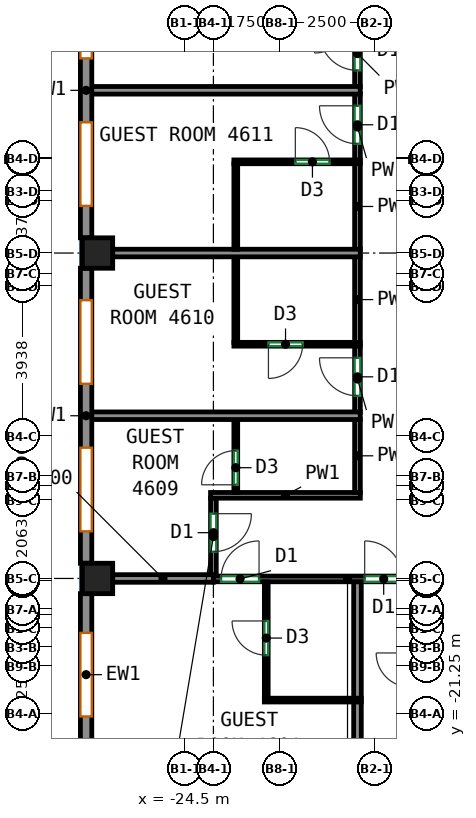
"""IFC4 building model, lengths in metres.
Left out: names, types, materials, properties, quantities, classifications, styles, units other than length and angle.
Written with IfcOpenShell. Run it as: python <this file> out.ifc"""

import sys

from ifc_helpers import new_model, si_unit, direction, frame, frame_2d, origin, origin_2d, place, context, subcontext, project, spatial, rectangle, extrude, source, transform, mapped, element, fill, save


model = new_model("IFC4")
c1 = context("Model", 3, precision=1e-05, world=origin(), true_north=direction((0.0, 1.0)))
c2 = subcontext(c1, "Body", "Model", "MODEL_VIEW")
j1 = project(units=[si_unit("LENGTHUNIT", "METRE"), si_unit("PLANEANGLEUNIT", "RADIAN")], contexts=[c1])
p1 = place(None, origin())
s1 = spatial("IfcSite", under=j1, at=p1, CompositionType="ELEMENT")
p2 = place(p1, origin())
s2 = spatial("IfcBuilding", under=s1, at=p2, CompositionType="ELEMENT")
p3 = place(p2, frame((0.0, 0.0, 192.3)))
s3 = spatial("IfcBuildingStorey", under=s2, at=p3, CompositionType="ELEMENT", Elevation=192.3)
m1 = source(origin(), c2, "Body", "SweptSolid", [
    extrude(rectangle(XDim=0.8, YDim=0.8, at=origin_2d()), origin(), (0.0, 0.0, 1.0), 3.0),
])
for number, where, z_axis, x_axis in (
    (1, (-26.8, -17.688, 0.0), (0.0, 0.0, 1.0), (1.0, 0.0, 0.0)),
    (2, (-26.8, -9.125, 0.0), (0.0, 0.0, 1.0), (1.0, 0.0, 0.0)),
):
    element("IfcColumn", number, at=place(p3, frame(where, z_axis=z_axis, x_axis=x_axis)), inside=s3, PredefinedType="COLUMN", context=c2, shape_type="MappedRepresentation", body=[
        mapped(m1, transform((0.0, 0.0, 0.0))),
    ])
m2 = source(origin(), c2, "Body", "SweptSolid", [
    extrude(rectangle(XDim=7.763, YDim=0.3, at=frame_2d((3.881, 0.0))), origin(), (0.0, 0.0, 1.0), 3.0),
])
p4 = place(p3, frame((-27.1, -0.962, 0.0), z_axis=(0.0, 0.0, 1.0), x_axis=(0.0, -1.0, 0.0)))
e3 = element("IfcWall", 3, at=p4, inside=s3, PredefinedType="SOLIDWALL", context=c2, shape_type="MappedRepresentation", body=[
    mapped(m2, transform((0.0, 0.0, 0.0))),
])
p5 = place(p4, frame((0.841, 0.0, 0.85)))
e4 = element("IfcOpeningElement", 4, at=p5, cuts=e3, PredefinedType="OPENING", context=c2, shape_type="SweptSolid", body=[
    extrude(rectangle(XDim=2.2, YDim=1.95, at=frame_2d((1.1, 0.975))), frame((0.0, 0.16, 0.0), z_axis=(0.0, -1.0, 0.0), x_axis=(1.0, 0.0, 0.0)), (0.0, 0.0, 1.0), 0.32),
])
p6 = place(p4, frame((4.722, 0.0, 0.85)))
e5 = element("IfcOpeningElement", 5, at=p6, cuts=e3, PredefinedType="OPENING", context=c2, shape_type="SweptSolid", body=[
    extrude(rectangle(XDim=2.2, YDim=1.95, at=frame_2d((1.1, 0.975))), frame((0.0, 0.16, 0.0), z_axis=(0.0, -1.0, 0.0), x_axis=(1.0, 0.0, 0.0)), (0.0, 0.0, 1.0), 0.32),
])
p7 = place(p3, frame((-27.1, -9.525, 0.0), z_axis=(0.0, 0.0, 1.0), x_axis=(0.0, -1.0, 0.0)))
e6 = element("IfcWall", 6, at=p7, inside=s3, PredefinedType="SOLIDWALL", context=c2, shape_type="MappedRepresentation", body=[
    mapped(m2, transform((0.0, 0.0, 0.0))),
])
p8 = place(p7, frame((0.841, 0.0, 0.85)))
e7 = element("IfcOpeningElement", 7, at=p8, cuts=e6, PredefinedType="OPENING", context=c2, shape_type="SweptSolid", body=[
    extrude(rectangle(XDim=2.2, YDim=1.95, at=frame_2d((1.1, 0.975))), frame((0.0, 0.16, 0.0), z_axis=(0.0, -1.0, 0.0), x_axis=(1.0, 0.0, 0.0)), (0.0, 0.0, 1.0), 0.32),
])
p9 = place(p7, frame((4.722, 0.0, 0.85)))
e8 = element("IfcOpeningElement", 8, at=p9, cuts=e6, PredefinedType="OPENING", context=c2, shape_type="SweptSolid", body=[
    extrude(rectangle(XDim=2.2, YDim=1.95, at=frame_2d((1.1, 0.975))), frame((0.0, 0.16, 0.0), z_axis=(0.0, -1.0, 0.0), x_axis=(1.0, 0.0, 0.0)), (0.0, 0.0, 1.0), 0.32),
])
m3 = source(origin(), c2, "Body", "SweptSolid", [
    extrude(rectangle(XDim=4.263, YDim=0.3, at=frame_2d((2.131, 0.0))), origin(), (0.0, 0.0, 1.0), 3.0),
])
p10 = place(p3, frame((-27.1, -18.087, 0.0), z_axis=(0.0, 0.0, 1.0), x_axis=(0.0, -1.0, 0.0)))
e9 = element("IfcWall", 9, at=p10, inside=s3, PredefinedType="SOLIDWALL", context=c2, shape_type="MappedRepresentation", body=[
    mapped(m3, transform((0.0, 0.0, 0.0))),
])
p11 = place(p10, frame((1.031, 0.0, 0.85)))
e10 = element("IfcOpeningElement", 10, at=p11, cuts=e9, PredefinedType="OPENING", context=c2, shape_type="SweptSolid", body=[
    extrude(rectangle(XDim=2.2, YDim=1.95, at=frame_2d((1.1, 0.975))), frame((0.0, 0.16, 0.0), z_axis=(0.0, -1.0, 0.0), x_axis=(1.0, 0.0, 0.0)), (0.0, 0.0, 1.0), 0.32),
])
p12 = place(p3, frame((-23.75, -17.7, 0.0), z_axis=(0.0, 0.0, 1.0), x_axis=(1.0, 0.0, 0.0)))
e11 = element("IfcWall", 11, at=p12, inside=s3, PredefinedType="PARTITIONING", context=c2, shape_type="SweptSolid", body=[
    extrude(rectangle(XDim=7.058, YDim=0.15, at=frame_2d((3.529, 0.0))), origin(), (0.0, 0.0, 1.0), 2.4),
])
p13 = place(p12, frame((0.201, 0.0, 0.0)))
e12 = element("IfcOpeningElement", 12, at=p13, cuts=e11, PredefinedType="OPENING", context=c2, shape_type="SweptSolid", body=[
    extrude(rectangle(XDim=1.0, YDim=2.1, at=frame_2d((0.5, 1.05))), frame((0.0, 0.085, 0.0), z_axis=(0.0, -1.0, 0.0), x_axis=(1.0, 0.0, 0.0)), (0.0, 0.0, 1.0), 0.17),
])
p14 = place(p12, frame((3.981, 0.0, 0.0)))
e13 = element("IfcOpeningElement", 13, at=p14, cuts=e11, PredefinedType="OPENING", context=c2, shape_type="SweptSolid", body=[
    extrude(rectangle(XDim=1.0, YDim=2.1, at=frame_2d((0.5, 1.05))), frame((0.0, 0.085, 0.0), z_axis=(0.0, -1.0, 0.0), x_axis=(1.0, 0.0, 0.0)), (0.0, 0.0, 1.0), 0.17),
])
p15 = place(p3, frame((-23.75, -15.575, 0.0), z_axis=(0.0, 0.0, 1.0), x_axis=(0.0, -1.0, 0.0)))
e14 = element("IfcWall", 14, at=p15, inside=s3, PredefinedType="PARTITIONING", context=c2, shape_type="SweptSolid", body=[
    extrude(rectangle(XDim=2.023, YDim=0.15, at=frame_2d((1.011, 0.0))), origin(), (0.0, 0.0, 1.0), 2.4),
])
p16 = place(p15, frame((0.408, 0.0, 0.0)))
e15 = element("IfcOpeningElement", 15, at=p16, cuts=e14, PredefinedType="OPENING", context=c2, shape_type="SweptSolid", body=[
    extrude(rectangle(XDim=1.0, YDim=2.1, at=frame_2d((0.5, 1.05))), frame((0.0, 0.085, 0.0), z_axis=(0.0, -1.0, 0.0), x_axis=(1.0, 0.0, 0.0)), (0.0, 0.0, 1.0), 0.17),
])
p17 = place(p3, frame((-23.825, -15.5, 0.0), z_axis=(0.0, 0.0, 1.0), x_axis=(1.0, 0.0, 0.0)))
e16 = element("IfcWall", 16, at=p17, inside=s3, PredefinedType="PARTITIONING", context=c2, shape_type="SweptSolid", body=[
    extrude(rectangle(XDim=3.941, YDim=0.15, at=frame_2d((1.97, 0.0))), origin(), (0.0, 0.0, 1.0), 3.0),
])
p18 = place(p3, frame((-19.959, -15.425, 0.0), z_axis=(0.0, 0.0, 1.0), x_axis=(0.0, 1.0, 0.0)))
e17 = element("IfcWall", 17, at=p18, inside=s3, PredefinedType="PARTITIONING", context=c2, shape_type="SweptSolid", body=[
    extrude(rectangle(XDim=1.929, YDim=0.15, at=frame_2d((0.964, 0.0))), origin(), (0.0, 0.0, 1.0), 3.0),
])
p19 = place(p3, frame((-19.959, -13.316, 0.0), z_axis=(0.0, 0.0, 1.0), x_axis=(0.0, 1.0, 0.0)))
e18 = element("IfcWall", 18, at=p19, inside=s3, PredefinedType="PARTITIONING", context=c2, shape_type="SweptSolid", body=[
    extrude(rectangle(XDim=1.751, YDim=0.15, at=frame_2d((0.875, 0.0))), origin(), (0.0, 0.0, 1.0), 3.0),
])
p20 = place(p19, frame((0.434, 0.0, 0.0)))
e19 = element("IfcOpeningElement", 19, at=p20, cuts=e18, PredefinedType="OPENING", context=c2, shape_type="SweptSolid", body=[
    extrude(rectangle(XDim=1.0, YDim=2.1, at=frame_2d((0.5, 1.05))), frame((0.0, 0.085, 0.0), z_axis=(0.0, -1.0, 0.0), x_axis=(1.0, 0.0, 0.0)), (0.0, 0.0, 1.0), 0.17),
])
p21 = place(p3, frame((-19.959, -11.485, 0.0), z_axis=(0.0, 0.0, 1.0), x_axis=(0.0, 1.0, 0.0)))
e20 = element("IfcWall", 20, at=p21, inside=s3, PredefinedType="PARTITIONING", context=c2, shape_type="SweptSolid", body=[
    extrude(rectangle(XDim=2.27, YDim=0.15, at=frame_2d((1.135, 0.0))), origin(), (0.0, 0.0, 1.0), 3.0),
])
p22 = place(p3, frame((-19.959, -6.685, 0.0), z_axis=(0.0, 0.0, 1.0), x_axis=(0.0, 1.0, 0.0)))
e21 = element("IfcWall", 21, at=p22, inside=s3, PredefinedType="PARTITIONING", context=c2, shape_type="SweptSolid", body=[
    extrude(rectangle(XDim=1.752, YDim=0.15, at=frame_2d((0.876, 0.0))), origin(), (0.0, 0.0, 1.0), 3.0),
])
p23 = place(p22, frame((0.435, 0.0, 0.0)))
e22 = element("IfcOpeningElement", 22, at=p23, cuts=e21, PredefinedType="OPENING", context=c2, shape_type="SweptSolid", body=[
    extrude(rectangle(XDim=1.0, YDim=2.1, at=frame_2d((0.5, 1.05))), frame((0.0, 0.085, 0.0), z_axis=(0.0, -1.0, 0.0), x_axis=(1.0, 0.0, 0.0)), (0.0, 0.0, 1.0), 0.17),
])
p24 = place(p3, frame((-19.959, -9.035, 0.0), z_axis=(0.0, 0.0, 1.0), x_axis=(0.0, 1.0, 0.0)))
e23 = element("IfcWall", 23, at=p24, inside=s3, PredefinedType="PARTITIONING", context=c2, shape_type="SweptSolid", body=[
    extrude(rectangle(XDim=2.27, YDim=0.15, at=frame_2d((1.135, 0.0))), origin(), (0.0, 0.0, 1.0), 3.0),
])
p25 = place(p3, frame((-19.959, -4.753, 0.0), z_axis=(0.0, 0.0, 1.0), x_axis=(0.0, 1.0, 0.0)))
e24 = element("IfcWall", 24, at=p25, inside=s3, PredefinedType="PARTITIONING", context=c2, shape_type="SweptSolid", body=[
    extrude(rectangle(XDim=1.751, YDim=0.15, at=frame_2d((0.875, 0.0))), origin(), (0.0, 0.0, 1.0), 3.0),
])
p26 = place(p25, frame((0.434, 0.0, 0.0)))
e25 = element("IfcOpeningElement", 25, at=p26, cuts=e24, PredefinedType="OPENING", context=c2, shape_type="SweptSolid", body=[
    extrude(rectangle(XDim=1.0, YDim=2.1, at=frame_2d((0.5, 1.05))), frame((0.0, 0.085, 0.0), z_axis=(0.0, -1.0, 0.0), x_axis=(1.0, 0.0, 0.0)), (0.0, 0.0, 1.0), 0.17),
])
p27 = place(p3, frame((-22.359, -20.838, 0.0), z_axis=(0.0, 0.0, 1.0), x_axis=(0.0, 1.0, 0.0)))
e26 = element("IfcWall", 26, at=p27, inside=s3, PredefinedType="PARTITIONING", context=c2, shape_type="SweptSolid", body=[
    extrude(rectangle(XDim=3.061, YDim=0.1, at=frame_2d((1.53, 0.0))), origin(), (0.0, 0.0, 1.0), 3.0),
])
p28 = place(p27, frame((1.132, 0.0, 0.0)))
e27 = element("IfcOpeningElement", 27, at=p28, cuts=e26, PredefinedType="OPENING", context=c2, shape_type="SweptSolid", body=[
    extrude(rectangle(XDim=0.9, YDim=2.1, at=frame_2d((0.45, 1.05))), frame((0.0, 0.06, 0.0), z_axis=(0.0, -1.0, 0.0), x_axis=(1.0, 0.0, 0.0)), (0.0, 0.0, 1.0), 0.12),
])
p29 = place(p3, frame((-22.409, -20.888, 0.0), z_axis=(0.0, 0.0, 1.0), x_axis=(1.0, 0.0, 0.0)))
e28 = element("IfcWall", 28, at=p29, inside=s3, PredefinedType="PARTITIONING", context=c2, shape_type="SweptSolid", body=[
    extrude(rectangle(XDim=2.55, YDim=0.1, at=frame_2d((1.275, 0.0))), origin(), (0.0, 0.0, 1.0), 3.0),
])
p30 = place(p3, frame((-19.959, -26.0, 0.0), z_axis=(0.0, 0.0, 1.0), x_axis=(0.0, 1.0, 0.0)))
e29 = element("IfcWall", 29, at=p30, inside=s3, PredefinedType="PARTITIONING", context=c2, shape_type="SweptSolid", body=[
    extrude(rectangle(XDim=5.062, YDim=0.2, at=frame_2d((2.531, 0.0))), origin(), (0.0, 0.0, 1.0), 3.0),
])
p31 = place(p3, frame((-26.4, -17.688, 0.0), z_axis=(0.0, 0.0, 1.0), x_axis=(1.0, 0.0, 0.0)))
e30 = element("IfcWall", 30, at=p31, inside=s3, PredefinedType="PARTITIONING", context=c2, shape_type="SweptSolid", body=[
    extrude(rectangle(XDim=2.648, YDim=0.2, at=frame_2d((1.324, 0.0))), origin(), (0.0, 0.0, 1.0), 2.4),
])
p32 = place(p3, frame((-19.959, -20.838, 0.0), z_axis=(0.0, 0.0, 1.0), x_axis=(0.0, 1.0, 0.0)))
e31 = element("IfcWall", 31, at=p32, inside=s3, PredefinedType="PARTITIONING", context=c2, shape_type="SweptSolid", body=[
    extrude(rectangle(XDim=3.061, YDim=0.2, at=frame_2d((1.53, 0.0))), origin(), (0.0, 0.0, 1.0), 3.0),
])
p33 = place(p3, frame((-23.161, -15.423, 0.0), z_axis=(0.0, 0.0, 1.0), x_axis=(0.0, 1.0, 0.0)))
e32 = element("IfcWall", 32, at=p33, inside=s3, PredefinedType="PARTITIONING", context=c2, shape_type="SweptSolid", body=[
    extrude(rectangle(XDim=1.917, YDim=0.1, at=frame_2d((0.958, 0.0))), origin(), (0.0, 0.0, 1.0), 3.0),
])
p34 = place(p33, frame((0.2, 0.0, 0.0)))
e33 = element("IfcOpeningElement", 33, at=p34, cuts=e32, PredefinedType="OPENING", context=c2, shape_type="SweptSolid", body=[
    extrude(rectangle(XDim=0.9, YDim=2.1, at=frame_2d((0.45, 1.05))), frame((0.0, 0.06, 0.0), z_axis=(0.0, -1.0, 0.0), x_axis=(1.0, 0.0, 0.0)), (0.0, 0.0, 1.0), 0.12),
])
p35 = place(p3, frame((-27.0, -13.406, 0.0), z_axis=(0.0, 0.0, 1.0), x_axis=(1.0, 0.0, 0.0)))
e34 = element("IfcWall", 34, at=p35, inside=s3, PredefinedType="PARTITIONING", context=c2, shape_type="SweptSolid", body=[
    extrude(rectangle(XDim=7.114, YDim=0.2, at=frame_2d((3.557, 0.0))), origin(), (0.0, 0.0, 1.0), 3.0),
])
p36 = place(p3, frame((-19.886, -11.525, 0.0), z_axis=(0.0, 0.0, 1.0), x_axis=(-1.0, 0.0, 0.0)))
e35 = element("IfcWall", 35, at=p36, inside=s3, PredefinedType="PARTITIONING", context=c2, shape_type="SweptSolid", body=[
    extrude(rectangle(XDim=3.325, YDim=0.1, at=frame_2d((1.663, 0.0))), origin(), (0.0, 0.0, 1.0), 3.0),
])
p37 = place(p36, frame((1.516, 0.0, 0.0)))
e36 = element("IfcOpeningElement", 36, at=p37, cuts=e35, PredefinedType="OPENING", context=c2, shape_type="SweptSolid", body=[
    extrude(rectangle(XDim=0.9, YDim=2.1, at=frame_2d((0.45, 1.05))), frame((0.0, 0.06, 0.0), z_axis=(0.0, -1.0, 0.0), x_axis=(1.0, 0.0, 0.0)), (0.0, 0.0, 1.0), 0.12),
])
p38 = place(p3, frame((-23.161, -11.475, 0.0), z_axis=(0.0, 0.0, 1.0), x_axis=(0.0, 1.0, 0.0)))
e37 = element("IfcWall", 37, at=p38, inside=s3, PredefinedType="PARTITIONING", context=c2, shape_type="SweptSolid", body=[
    extrude(rectangle(XDim=2.25, YDim=0.1, at=frame_2d((1.125, 0.0))), origin(), (0.0, 0.0, 1.0), 3.0),
])
p39 = place(p3, frame((-26.4, -9.125, 0.0), z_axis=(0.0, 0.0, 1.0), x_axis=(1.0, 0.0, 0.0)))
e38 = element("IfcWall", 38, at=p39, inside=s3, PredefinedType="PARTITIONING", context=c2, shape_type="SweptSolid", body=[
    extrude(rectangle(XDim=6.514, YDim=0.2, at=frame_2d((3.257, 0.0))), origin(), (0.0, 0.0, 1.0), 3.0),
])
p40 = place(p3, frame((-23.211, -6.725, 0.0), z_axis=(0.0, 0.0, 1.0), x_axis=(1.0, 0.0, 0.0)))
e39 = element("IfcWall", 39, at=p40, inside=s3, PredefinedType="PARTITIONING", context=c2, shape_type="SweptSolid", body=[
    extrude(rectangle(XDim=3.325, YDim=0.1, at=frame_2d((1.663, 0.0))), origin(), (0.0, 0.0, 1.0), 3.0),
])
p41 = place(p40, frame((1.617, 0.0, 0.0)))
e40 = element("IfcOpeningElement", 40, at=p41, cuts=e39, PredefinedType="OPENING", context=c2, shape_type="SweptSolid", body=[
    extrude(rectangle(XDim=0.9, YDim=2.1, at=frame_2d((0.45, 1.05))), frame((0.0, 0.06, 0.0), z_axis=(0.0, -1.0, 0.0), x_axis=(1.0, 0.0, 0.0)), (0.0, 0.0, 1.0), 0.12),
])
p42 = place(p3, frame((-23.161, -9.025, 0.0), z_axis=(0.0, 0.0, 1.0), x_axis=(0.0, 1.0, 0.0)))
e41 = element("IfcWall", 41, at=p42, inside=s3, PredefinedType="PARTITIONING", context=c2, shape_type="SweptSolid", body=[
    extrude(rectangle(XDim=2.25, YDim=0.1, at=frame_2d((1.125, 0.0))), origin(), (0.0, 0.0, 1.0), 3.0),
])
p43 = place(p3, frame((-27.0, -4.843, 0.0), z_axis=(0.0, 0.0, 1.0), x_axis=(1.0, 0.0, 0.0)))
e42 = element("IfcWall", 42, at=p43, inside=s3, PredefinedType="PARTITIONING", context=c2, shape_type="SweptSolid", body=[
    extrude(rectangle(XDim=7.114, YDim=0.2, at=frame_2d((3.557, 0.0))), origin(), (0.0, 0.0, 1.0), 3.0),
])
p44 = place(p5, origin())
e43 = element("IfcWindow", 43, at=p44, inside=s3, PartitioningType="SINGLE_PANEL", PredefinedType="WINDOW", context=c2, shape_type="SweptSolid", body=[
    extrude(rectangle(XDim=2.2, YDim=1.95, at=frame_2d((1.1, 0.975))), frame((0.0, 0.03, 0.0), z_axis=(0.0, -1.0, 0.0), x_axis=(1.0, 0.0, 0.0)), (0.0, 0.0, 1.0), 0.06),
])
fill(e4, e43)
p45 = place(p6, origin())
e44 = element("IfcWindow", 44, at=p45, inside=s3, PartitioningType="SINGLE_PANEL", PredefinedType="WINDOW", context=c2, shape_type="SweptSolid", body=[
    extrude(rectangle(XDim=2.2, YDim=1.95, at=frame_2d((1.1, 0.975))), frame((0.0, 0.03, 0.0), z_axis=(0.0, -1.0, 0.0), x_axis=(1.0, 0.0, 0.0)), (0.0, 0.0, 1.0), 0.06),
])
fill(e5, e44)
p46 = place(p8, origin())
e45 = element("IfcWindow", 45, at=p46, inside=s3, PartitioningType="SINGLE_PANEL", PredefinedType="WINDOW", context=c2, shape_type="SweptSolid", body=[
    extrude(rectangle(XDim=2.2, YDim=1.95, at=frame_2d((1.1, 0.975))), frame((0.0, 0.03, 0.0), z_axis=(0.0, -1.0, 0.0), x_axis=(1.0, 0.0, 0.0)), (0.0, 0.0, 1.0), 0.06),
])
fill(e7, e45)
p47 = place(p9, origin())
e46 = element("IfcWindow", 46, at=p47, inside=s3, PartitioningType="SINGLE_PANEL", PredefinedType="WINDOW", context=c2, shape_type="SweptSolid", body=[
    extrude(rectangle(XDim=2.2, YDim=1.95, at=frame_2d((1.1, 0.975))), frame((0.0, 0.03, 0.0), z_axis=(0.0, -1.0, 0.0), x_axis=(1.0, 0.0, 0.0)), (0.0, 0.0, 1.0), 0.06),
])
fill(e8, e46)
p48 = place(p11, origin())
e47 = element("IfcWindow", 47, at=p48, inside=s3, PartitioningType="SINGLE_PANEL", PredefinedType="WINDOW", context=c2, shape_type="SweptSolid", body=[
    extrude(rectangle(XDim=2.2, YDim=1.95, at=frame_2d((1.1, 0.975))), frame((0.0, 0.03, 0.0), z_axis=(0.0, -1.0, 0.0), x_axis=(1.0, 0.0, 0.0)), (0.0, 0.0, 1.0), 0.06),
])
fill(e10, e47)
p49 = place(p28, origin())
e48 = element("IfcDoor", 48, at=p49, inside=s3, OperationType="SINGLE_SWING_RIGHT", PredefinedType="DOOR", context=c2, shape_type="SweptSolid", body=[
    extrude(rectangle(XDim=0.9, YDim=2.1, at=frame_2d((0.45, 1.05))), frame((0.0, 0.025, 0.0), z_axis=(0.0, -1.0, 0.0), x_axis=(1.0, 0.0, 0.0)), (0.0, 0.0, 1.0), 0.05),
])
fill(e27, e48)
p50 = place(p13, origin())
e49 = element("IfcDoor", 49, at=p50, inside=s3, OperationType="SINGLE_SWING_RIGHT", PredefinedType="DOOR", context=c2, shape_type="SweptSolid", body=[
    extrude(rectangle(XDim=1.0, YDim=2.1, at=frame_2d((0.5, 1.05))), frame((0.0, 0.025, 0.0), z_axis=(0.0, -1.0, 0.0), x_axis=(1.0, 0.0, 0.0)), (0.0, 0.0, 1.0), 0.05),
])
fill(e12, e49)
p51 = place(p14, origin())
e50 = element("IfcDoor", 50, at=p51, inside=s3, OperationType="SINGLE_SWING_LEFT", PredefinedType="DOOR", context=c2, shape_type="SweptSolid", body=[
    extrude(rectangle(XDim=1.0, YDim=2.1, at=frame_2d((0.5, 1.05))), frame((0.0, 0.025, 0.0), z_axis=(0.0, -1.0, 0.0), x_axis=(1.0, 0.0, 0.0)), (0.0, 0.0, 1.0), 0.05),
])
fill(e13, e50)
p52 = place(p16, origin())
e51 = element("IfcDoor", 51, at=p52, inside=s3, OperationType="SINGLE_SWING_LEFT", PredefinedType="DOOR", context=c2, shape_type="SweptSolid", body=[
    extrude(rectangle(XDim=1.0, YDim=2.1, at=frame_2d((0.5, 1.05))), frame((0.0, 0.025, 0.0), z_axis=(0.0, -1.0, 0.0), x_axis=(1.0, 0.0, 0.0)), (0.0, 0.0, 1.0), 0.05),
])
fill(e15, e51)
p53 = place(p34, origin())
e52 = element("IfcDoor", 52, at=p53, inside=s3, OperationType="SINGLE_SWING_LEFT", PredefinedType="DOOR", context=c2, shape_type="SweptSolid", body=[
    extrude(rectangle(XDim=0.9, YDim=2.1, at=frame_2d((0.45, 1.05))), frame((0.0, 0.025, 0.0), z_axis=(0.0, -1.0, 0.0), x_axis=(1.0, 0.0, 0.0)), (0.0, 0.0, 1.0), 0.05),
])
fill(e33, e52)
p54 = place(p20, origin())
e53 = element("IfcDoor", 53, at=p54, inside=s3, OperationType="SINGLE_SWING_RIGHT", PredefinedType="DOOR", context=c2, shape_type="SweptSolid", body=[
    extrude(rectangle(XDim=1.0, YDim=2.1, at=frame_2d((0.5, 1.05))), frame((0.0, 0.025, 0.0), z_axis=(0.0, -1.0, 0.0), x_axis=(1.0, 0.0, 0.0)), (0.0, 0.0, 1.0), 0.05),
])
fill(e19, e53)
p55 = place(p37, origin())
e54 = element("IfcDoor", 54, at=p55, inside=s3, OperationType="SINGLE_SWING_RIGHT", PredefinedType="DOOR", context=c2, shape_type="SweptSolid", body=[
    extrude(rectangle(XDim=0.9, YDim=2.1, at=frame_2d((0.45, 1.05))), frame((0.0, 0.025, 0.0), z_axis=(0.0, -1.0, 0.0), x_axis=(1.0, 0.0, 0.0)), (0.0, 0.0, 1.0), 0.05),
])
fill(e36, e54)
p56 = place(p41, origin())
e55 = element("IfcDoor", 55, at=p56, inside=s3, OperationType="SINGLE_SWING_LEFT", PredefinedType="DOOR", context=c2, shape_type="SweptSolid", body=[
    extrude(rectangle(XDim=0.9, YDim=2.1, at=frame_2d((0.45, 1.05))), frame((0.0, 0.025, 0.0), z_axis=(0.0, -1.0, 0.0), x_axis=(1.0, 0.0, 0.0)), (0.0, 0.0, 1.0), 0.05),
])
fill(e40, e55)
p57 = place(p23, origin())
e56 = element("IfcDoor", 56, at=p57, inside=s3, OperationType="SINGLE_SWING_RIGHT", PredefinedType="DOOR", context=c2, shape_type="SweptSolid", body=[
    extrude(rectangle(XDim=1.0, YDim=2.1, at=frame_2d((0.5, 1.05))), frame((0.0, 0.025, 0.0), z_axis=(0.0, -1.0, 0.0), x_axis=(1.0, 0.0, 0.0)), (0.0, 0.0, 1.0), 0.05),
])
fill(e22, e56)
p58 = place(p26, origin())
e57 = element("IfcDoor", 57, at=p58, inside=s3, OperationType="SINGLE_SWING_RIGHT", PredefinedType="DOOR", context=c2, shape_type="SweptSolid", body=[
    extrude(rectangle(XDim=1.0, YDim=2.1, at=frame_2d((0.5, 1.05))), frame((0.0, 0.025, 0.0), z_axis=(0.0, -1.0, 0.0), x_axis=(1.0, 0.0, 0.0)), (0.0, 0.0, 1.0), 0.05),
])
fill(e25, e57)
save(model, sys.argv[1])
